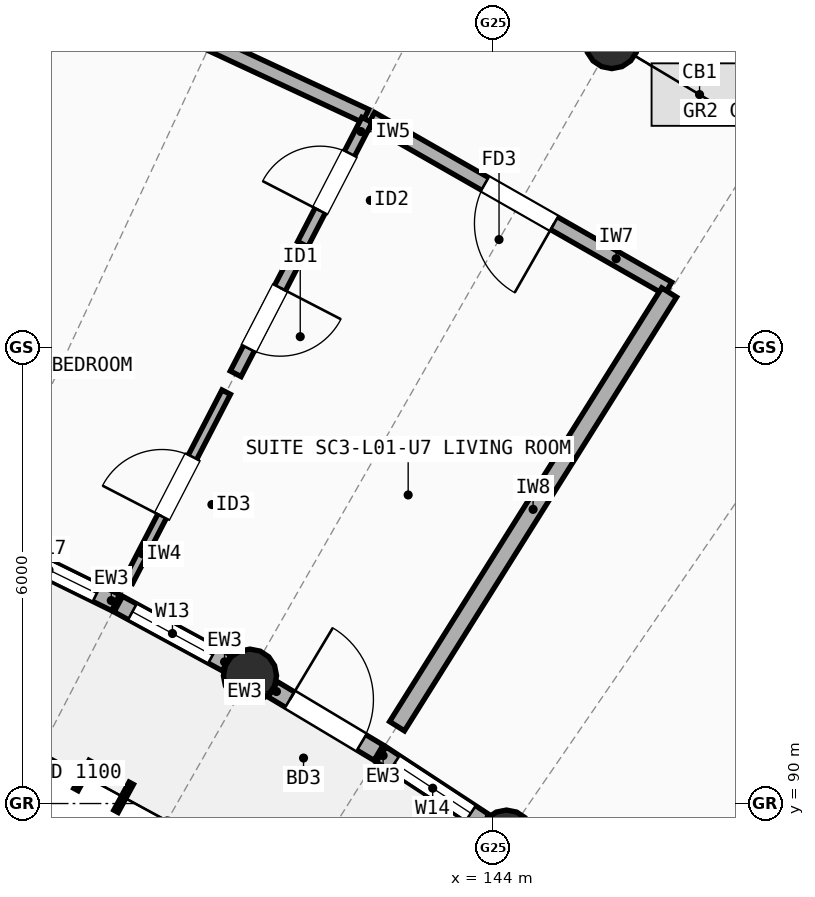
"""IFC4 building model, lengths in metres.
Left out: names, types, materials, properties, quantities, classifications, styles, units other than length and angle.
Written with IfcOpenShell. Run it as: python <this file> out.ifc"""

import sys

from ifc_helpers import new_model, si_unit, direction, frame, frame_2d, origin, origin_2d, place, context, subcontext, project, spatial, rectangle, circle, extrude, element, fill, save


model = new_model("IFC4")
c1 = context("Model", 3, precision=1e-05, world=origin(), true_north=direction((0.0, 1.0)))
c2 = subcontext(c1, "Body", "Model", "MODEL_VIEW")
j1 = project(units=[si_unit("LENGTHUNIT", "METRE"), si_unit("PLANEANGLEUNIT", "RADIAN")], contexts=[c1])
p1 = place(None, origin())
s1 = spatial("IfcSite", under=j1, at=p1, CompositionType="ELEMENT")
p2 = place(p1, origin())
s2 = spatial("IfcBuilding", under=s1, at=p2, CompositionType="ELEMENT")
p3 = place(p2, frame((0.0, 0.0, 4.5)))
s3 = spatial("IfcBuildingStorey", under=s2, at=p3, CompositionType="ELEMENT", Elevation=4.5)
for number, where, z_axis, x_axis in (
    (1, (140.804, 91.682, 0.0), (0.0, 0.0, 1.0), (1.0, 0.0, 0.0)),
    (2, (145.564, 100.018, 0.0), (0.0, 0.0, 1.0), (1.0, 0.0, 0.0)),
    (3, (144.178, 89.564, 0.0), (0.0, 0.0, 1.0), (1.0, 0.0, 0.0)),
):
    element("IfcColumn", number, at=place(p3, frame(where, z_axis=z_axis, x_axis=x_axis)), inside=s3, PredefinedType="COLUMN", context=c2, shape_type="SweptSolid", body=[
        extrude(circle(Radius=0.35, at=origin_2d()), origin(), (0.0, 0.0, 1.0), 2.948),
    ])
p4 = place(p3, frame((137.283, 93.503, 0.0), z_axis=(0.0, 0.0, 1.0), x_axis=(0.897531751182, -0.44094983345, 0.0)))
e4 = element("IfcWall", 4, at=p4, inside=s3, PredefinedType="STANDARD", context=c2, shape_type="SweptSolid", body=[
    extrude(rectangle(XDim=1.952, YDim=0.235, at=frame_2d((0.976, 0.0))), origin(), (0.0, 0.0, 1.0), 2.684),
])
p5 = place(p4, frame((0.276, 0.0, 0.85)))
e5 = element("IfcOpeningElement", 5, at=p5, cuts=e4, PredefinedType="OPENING", context=c2, shape_type="SweptSolid", body=[
    extrude(rectangle(XDim=1.4, YDim=1.5, at=frame_2d((0.7, 0.75))), frame((0.0, 0.127, 0.0), z_axis=(0.0, -1.0, 0.0), x_axis=(1.0, 0.0, 0.0)), (0.0, 0.0, 1.0), 0.255),
])
p6 = place(p3, frame((139.071, 92.624, 0.0), z_axis=(0.0, 0.0, 1.0), x_axis=(0.878452871629, -0.477828999044, 0.0)))
e6 = element("IfcWall", 6, at=p6, inside=s3, PredefinedType="STANDARD", context=c2, shape_type="SweptSolid", body=[
    extrude(rectangle(XDim=1.622, YDim=0.235, at=frame_2d((0.811, 0.0))), origin(), (0.0, 0.0, 1.0), 2.684),
])
p7 = place(p6, frame((0.211, 0.0, 0.85)))
e7 = element("IfcOpeningElement", 7, at=p7, cuts=e6, PredefinedType="OPENING", context=c2, shape_type="SweptSolid", body=[
    extrude(rectangle(XDim=1.2, YDim=1.45, at=frame_2d((0.6, 0.725))), frame((0.0, 0.127, 0.0), z_axis=(0.0, -1.0, 0.0), x_axis=(1.0, 0.0, 0.0)), (0.0, 0.0, 1.0), 0.255),
])
p8 = place(p3, frame((141.104, 91.502, 0.0), z_axis=(0.0, 0.0, 1.0), x_axis=(0.85782472272, -0.513942355805, 0.0)))
e8 = element("IfcWall", 8, at=p8, inside=s3, PredefinedType="STANDARD", context=c2, shape_type="SweptSolid", body=[
    extrude(rectangle(XDim=1.622, YDim=0.235, at=frame_2d((0.811, 0.0))), origin(), (0.0, 0.0, 1.0), 2.684),
])
p9 = place(p8, frame((0.261, 0.0, 0.0)))
e9 = element("IfcOpeningElement", 9, at=p9, cuts=e8, PredefinedType="OPENING", context=c2, shape_type="SweptSolid", body=[
    extrude(rectangle(XDim=1.1, YDim=2.15, at=frame_2d((0.55, 1.075))), frame((0.0, 0.127, 0.0), z_axis=(0.0, -1.0, 0.0), x_axis=(1.0, 0.0, 0.0)), (0.0, 0.0, 1.0), 0.255),
])
p10 = place(p3, frame((142.53, 90.647, 0.0), z_axis=(0.0, 0.0, 1.0), x_axis=(0.835873156341, -0.548922641644, 0.0)))
e10 = element("IfcWall", 10, at=p10, inside=s3, PredefinedType="STANDARD", context=c2, shape_type="SweptSolid", body=[
    extrude(rectangle(XDim=1.623, YDim=0.235, at=frame_2d((0.811, 0.0))), origin(), (0.0, 0.0, 1.0), 2.684),
])
p11 = place(p10, frame((0.211, 0.0, 0.85)))
e11 = element("IfcOpeningElement", 11, at=p11, cuts=e10, PredefinedType="OPENING", context=c2, shape_type="SweptSolid", body=[
    extrude(rectangle(XDim=1.2, YDim=1.5, at=frame_2d((0.6, 0.75))), frame((0.0, 0.127, 0.0), z_axis=(0.0, -1.0, 0.0), x_axis=(1.0, 0.0, 0.0)), (0.0, 0.0, 1.0), 0.255),
])
p12 = place(p3, frame((135.605, 94.707, 0.0), z_axis=(0.0, 0.0, 1.0), x_axis=(0.384190705314, 0.923253758157, 0.0)))
e12 = element("IfcWall", 12, at=p12, inside=s3, PredefinedType="SOLIDWALL", context=c2, shape_type="SweptSolid", body=[
    extrude(rectangle(XDim=6.736, YDim=0.23, at=frame_2d((3.368, 0.0))), origin(), (0.0, 0.0, 1.0), 2.722),
])
p13 = place(p3, frame((138.245, 100.946, 0.0), z_axis=(0.0, 0.0, 1.0), x_axis=(0.906512639591, -0.422178675755, 0.0)))
e13 = element("IfcWall", 13, at=p13, inside=s3, PredefinedType="SOLIDWALL", context=c2, shape_type="SweptSolid", body=[
    extrude(rectangle(XDim=4.501, YDim=0.19, at=frame_2d((2.251, 0.0))), origin(), (0.0, 0.0, 1.0), 2.742),
])
p14 = place(p3, frame((142.396, 99.009, 0.0), z_axis=(0.0, 0.0, 1.0), x_axis=(0.868376606973, -0.495905301909, 0.0)))
e14 = element("IfcWall", 14, at=p14, inside=s3, PredefinedType="SOLIDWALL", context=c2, shape_type="SweptSolid", body=[
    extrude(rectangle(XDim=4.502, YDim=0.19, at=frame_2d((2.251, 0.0))), origin(), (0.0, 0.0, 1.0), 2.722),
])
p15 = place(p14, frame((1.726, 0.0, 0.0)))
e15 = element("IfcOpeningElement", 15, at=p15, cuts=e14, PredefinedType="OPENING", context=c2, shape_type="SweptSolid", body=[
    extrude(rectangle(XDim=1.05, YDim=2.15, at=frame_2d((0.525, 1.075))), frame((0.0, 0.105, 0.0), z_axis=(0.0, -1.0, 0.0), x_axis=(1.0, 0.0, 0.0)), (0.0, 0.0, 1.0), 0.21),
])
p16 = place(p3, frame((139.204, 92.925, 0.0), z_axis=(0.0, 0.0, 1.0), x_axis=(0.459449012792, 0.888204145816, 0.0)))
e16 = element("IfcWall", 16, at=p16, inside=s3, PredefinedType="PARTITIONING", context=c2, shape_type="SweptSolid", body=[
    extrude(rectangle(XDim=2.8, YDim=0.125, at=frame_2d((1.4, 0.0))), origin(), (0.0, 0.0, 1.0), 2.762),
])
p17 = place(p16, frame((0.96, 0.0, 0.0)))
e17 = element("IfcOpeningElement", 17, at=p17, cuts=e16, PredefinedType="OPENING", context=c2, shape_type="SweptSolid", body=[
    extrude(rectangle(XDim=0.88, YDim=2.1, at=frame_2d((0.44, 1.05))), frame((0.0, 0.073, 0.0), z_axis=(0.0, -1.0, 0.0), x_axis=(1.0, 0.0, 0.0)), (0.0, 0.0, 1.0), 0.145),
])
p18 = place(p3, frame((140.615, 95.654, 0.0), z_axis=(0.0, 0.0, 1.0), x_axis=(0.459495453195, 0.888180121649, 0.0)))
e18 = element("IfcWall", 18, at=p18, inside=s3, PredefinedType="PLUMBINGWALL", context=c2, shape_type="SweptSolid", body=[
    extrude(rectangle(XDim=1.648, YDim=0.16, at=frame_2d((0.824, 0.0))), origin(), (0.0, 0.0, 1.0), 2.762),
])
p19 = place(p18, frame((0.374, 0.0, 0.0)))
e19 = element("IfcOpeningElement", 19, at=p19, cuts=e18, PredefinedType="OPENING", context=c2, shape_type="SweptSolid", body=[
    extrude(rectangle(XDim=0.9, YDim=2.1, at=frame_2d((0.45, 1.05))), frame((0.0, 0.09, 0.0), z_axis=(0.0, -1.0, 0.0), x_axis=(1.0, 0.0, 0.0)), (0.0, 0.0, 1.0), 0.18),
])
p20 = place(p3, frame((141.498, 97.359, 0.0), z_axis=(0.0, 0.0, 1.0), x_axis=(0.459379600499, 0.888240047873, 0.0)))
e20 = element("IfcWall", 20, at=p20, inside=s3, PredefinedType="PARTITIONING", context=c2, shape_type="SweptSolid", body=[
    extrude(rectangle(XDim=1.84, YDim=0.15, at=frame_2d((0.92, 0.0))), origin(), (0.0, 0.0, 1.0), 2.762),
])
p21 = place(p20, frame((0.495, 0.0, 0.0)))
e21 = element("IfcOpeningElement", 21, at=p21, cuts=e20, PredefinedType="OPENING", context=c2, shape_type="SweptSolid", body=[
    extrude(rectangle(XDim=0.85, YDim=2.1, at=frame_2d((0.425, 1.05))), frame((0.0, 0.085, 0.0), z_axis=(0.0, -1.0, 0.0), x_axis=(1.0, 0.0, 0.0)), (0.0, 0.0, 1.0), 0.17),
])
p22 = place(p3, frame((142.738, 91.017, 0.0), z_axis=(0.0, 0.0, 1.0), x_axis=(0.531512997039, 0.847050136638, 0.0)))
e22 = element("IfcWall", 22, at=p22, inside=s3, PredefinedType="SOLIDWALL", context=c2, shape_type="SweptSolid", body=[
    extrude(rectangle(XDim=6.736, YDim=0.23, at=frame_2d((3.368, 0.0))), origin(), (0.0, 0.0, 1.0), 2.742),
])
p23 = place(p5, origin())
e23 = element("IfcWindow", 23, at=p23, inside=s3, PartitioningType="SINGLE_PANEL", PredefinedType="WINDOW", context=c2, shape_type="SweptSolid", body=[
    extrude(rectangle(XDim=1.4, YDim=1.5, at=frame_2d((0.7, 0.75))), frame((0.0, 0.03, 0.0), z_axis=(0.0, -1.0, 0.0), x_axis=(1.0, 0.0, 0.0)), (0.0, 0.0, 1.0), 0.06),
])
fill(e5, e23)
p24 = place(p7, origin())
e24 = element("IfcWindow", 24, at=p24, inside=s3, PartitioningType="SINGLE_PANEL", PredefinedType="WINDOW", context=c2, shape_type="SweptSolid", body=[
    extrude(rectangle(XDim=1.2, YDim=1.45, at=frame_2d((0.6, 0.725))), frame((0.0, 0.03, 0.0), z_axis=(0.0, -1.0, 0.0), x_axis=(1.0, 0.0, 0.0)), (0.0, 0.0, 1.0), 0.06),
])
fill(e7, e24)
p25 = place(p9, frame((1.1, 0.0, 0.0), z_axis=(0.0, 0.0, 1.0), x_axis=(-1.0, 0.0, 0.0)))
e25 = element("IfcDoor", 25, at=p25, inside=s3, OperationType="SINGLE_SWING_LEFT", PredefinedType="DOOR", context=c2, shape_type="SweptSolid", body=[
    extrude(rectangle(XDim=1.1, YDim=2.15, at=frame_2d((0.55, 1.075))), frame((0.0, 0.025, 0.0), z_axis=(0.0, -1.0, 0.0), x_axis=(1.0, 0.0, 0.0)), (0.0, 0.0, 1.0), 0.05),
])
fill(e9, e25)
p26 = place(p11, origin())
e26 = element("IfcWindow", 26, at=p26, inside=s3, PartitioningType="SINGLE_PANEL", PredefinedType="WINDOW", context=c2, shape_type="SweptSolid", body=[
    extrude(rectangle(XDim=1.2, YDim=1.5, at=frame_2d((0.6, 0.75))), frame((0.0, 0.03, 0.0), z_axis=(0.0, -1.0, 0.0), x_axis=(1.0, 0.0, 0.0)), (0.0, 0.0, 1.0), 0.06),
])
fill(e11, e26)
p27 = place(p15, origin())
e27 = element("IfcDoor", 27, at=p27, inside=s3, OperationType="SINGLE_SWING_RIGHT", PredefinedType="DOOR", context=c2, shape_type="SweptSolid", body=[
    extrude(rectangle(XDim=1.05, YDim=2.15, at=frame_2d((0.525, 1.075))), frame((0.0, 0.025, 0.0), z_axis=(0.0, -1.0, 0.0), x_axis=(1.0, 0.0, 0.0)), (0.0, 0.0, 1.0), 0.05),
])
fill(e15, e27)
p28 = place(p17, origin())
e28 = element("IfcDoor", 28, at=p28, inside=s3, OperationType="SINGLE_SWING_LEFT", PredefinedType="DOOR", context=c2, shape_type="SweptSolid", body=[
    extrude(rectangle(XDim=0.88, YDim=2.1, at=frame_2d((0.44, 1.05))), frame((0.0, 0.025, 0.0), z_axis=(0.0, -1.0, 0.0), x_axis=(1.0, 0.0, 0.0)), (0.0, 0.0, 1.0), 0.05),
])
fill(e17, e28)
p29 = place(p19, origin())
e29 = element("IfcDoor", 29, at=p29, inside=s3, OperationType="SINGLE_SWING_RIGHT", PredefinedType="DOOR", context=c2, shape_type="SweptSolid", body=[
    extrude(rectangle(XDim=0.9, YDim=2.1, at=frame_2d((0.45, 1.05))), frame((0.0, 0.025, 0.0), z_axis=(0.0, -1.0, 0.0), x_axis=(1.0, 0.0, 0.0)), (0.0, 0.0, 1.0), 0.05),
])
fill(e19, e29)
p30 = place(p21, origin())
e30 = element("IfcDoor", 30, at=p30, inside=s3, OperationType="SINGLE_SWING_LEFT", PredefinedType="DOOR", context=c2, shape_type="SweptSolid", body=[
    extrude(rectangle(XDim=0.85, YDim=2.1, at=frame_2d((0.425, 1.05))), frame((0.0, 0.025, 0.0), z_axis=(0.0, -1.0, 0.0), x_axis=(1.0, 0.0, 0.0)), (0.0, 0.0, 1.0), 0.05),
])
fill(e21, e30)
save(model, sys.argv[1])
